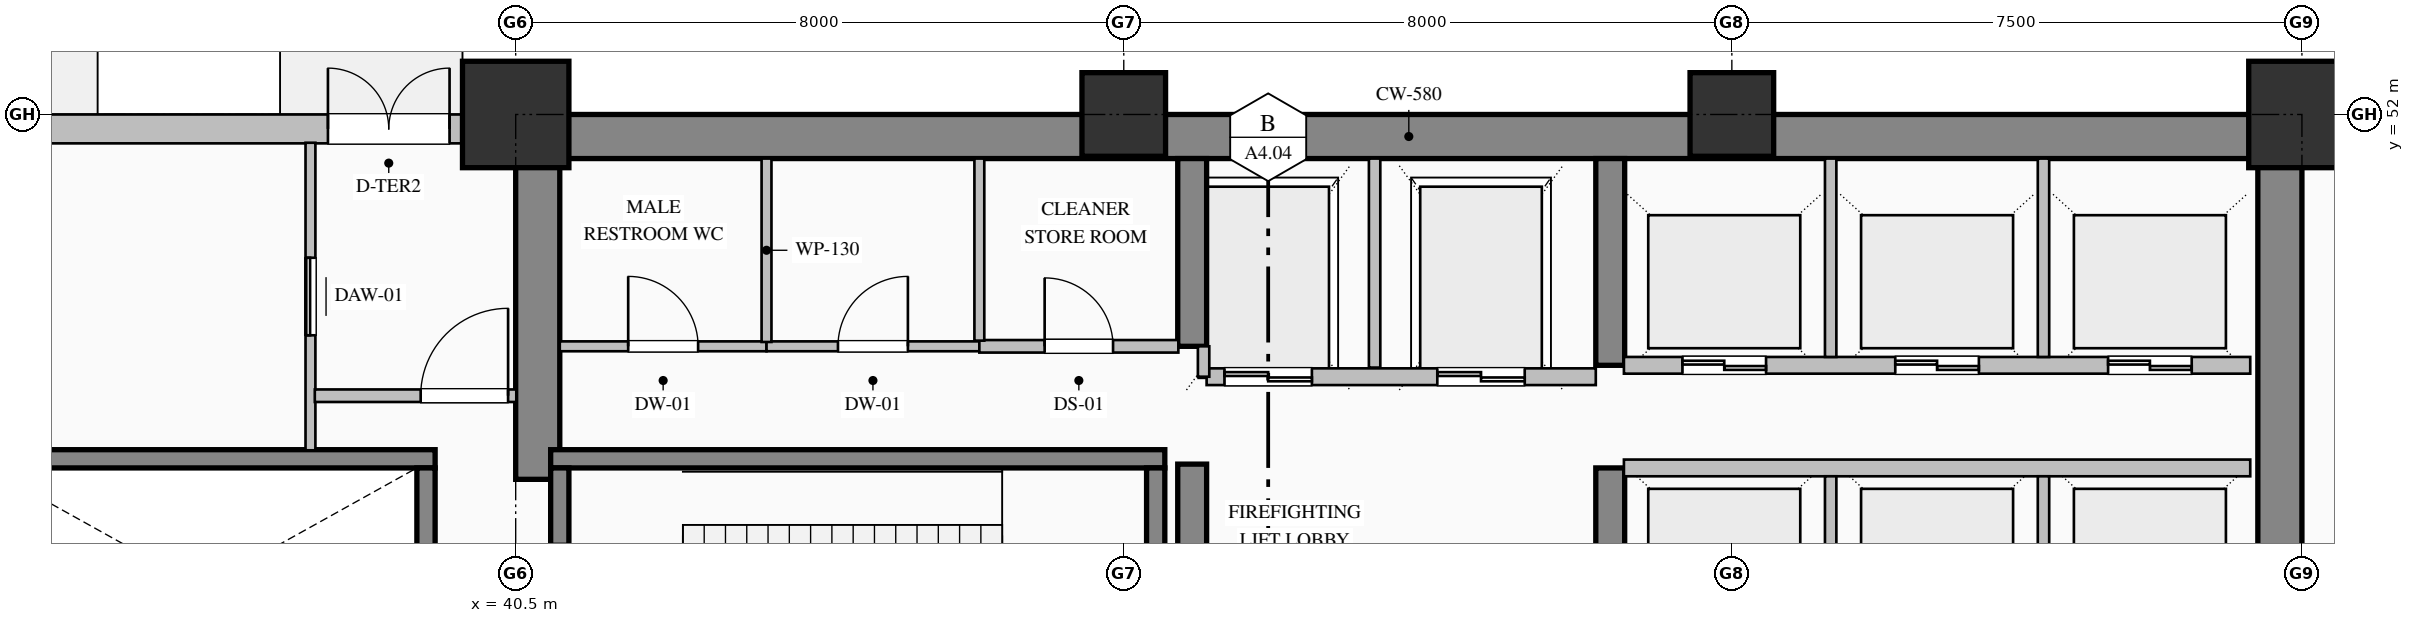
"""IFC4 building model, lengths in metres.
Left out: names, types, materials, properties, quantities, classifications, styles, units other than length and angle.
Written with IfcOpenShell. Run it as: python <this file> out.ifc"""

import sys

from ifc_helpers import new_model, si_unit, direction, frame, frame_2d, origin, origin_2d, place, context, subcontext, project, spatial, rectangle, hollow_rectangle, extrude, element, fill, save


model = new_model("IFC4")
c1 = context("Model", 3, precision=1e-05, world=origin(), true_north=direction((0.0, 1.0)))
c2 = subcontext(c1, "Body", "Model", "MODEL_VIEW")
j1 = project(units=[si_unit("LENGTHUNIT", "METRE"), si_unit("PLANEANGLEUNIT", "RADIAN")], contexts=[c1])
p1 = place(None, origin())
s1 = spatial("IfcSite", under=j1, at=p1, CompositionType="ELEMENT")
p2 = place(p1, origin())
s2 = spatial("IfcBuilding", under=s1, at=p2, CompositionType="ELEMENT")
p3 = place(p2, origin())
s3 = spatial("IfcBuildingStorey", under=s2, at=p3, CompositionType="ELEMENT", Elevation=0.0)
p4 = place(p3, frame((40.5, 51.71, 0.0), z_axis=(0.0, 0.0, 1.0), x_axis=(1.0, 0.0, 0.0)))
e1 = element("IfcWall", 1, at=p4, inside=s3, PredefinedType="SHEAR", context=c2, shape_type="SweptSolid", body=[
    extrude(rectangle(XDim=23.5, YDim=0.58, at=frame_2d((11.75, 0.0))), origin(), (0.0, 0.0, 1.0), 5.72),
])
p5 = place(p3, frame((63.71, 36.32, 0.0), z_axis=(0.0, 0.0, 1.0), x_axis=(0.0, 1.0, 0.0)))
e2 = element("IfcWall", 2, at=p5, inside=s3, PredefinedType="SHEAR", context=c2, shape_type="SweptSolid", body=[
    extrude(rectangle(XDim=15.1, YDim=0.58, at=frame_2d((7.55, 0.0))), origin(), (0.0, 0.0, 1.0), 5.72),
])
p6 = place(p3, frame((40.79, 47.2, 0.0), z_axis=(0.0, 0.0, 1.0), x_axis=(0.0, 1.0, 0.0)))
e3 = element("IfcWall", 3, at=p6, inside=s3, PredefinedType="SHEAR", context=c2, shape_type="SweptSolid", body=[
    extrude(rectangle(XDim=4.22, YDim=0.58, at=frame_2d((2.11, 0.0))), origin(), (0.0, 0.0, 1.0), 5.72),
])
p7 = place(p3, frame((49.4, 44.4, 0.0), z_axis=(0.0, 0.0, 1.0), x_axis=(0.0, 1.0, 0.0)))
e4 = element("IfcWall", 4, at=p7, inside=s3, PredefinedType="SHEAR", context=c2, shape_type="SweptSolid", body=[
    extrude(rectangle(XDim=3.0, YDim=0.38, at=frame_2d((1.5, 0.0))), origin(), (0.0, 0.0, 1.0), 5.72),
])
p8 = place(p3, frame((49.4, 48.95, 0.0), z_axis=(0.0, 0.0, 1.0), x_axis=(0.0, 1.0, 0.0)))
e5 = element("IfcWall", 5, at=p8, inside=s3, PredefinedType="SHEAR", context=c2, shape_type="SweptSolid", body=[
    extrude(rectangle(XDim=2.47, YDim=0.38, at=frame_2d((1.235, 0.0))), origin(), (0.0, 0.0, 1.0), 5.72),
])
p9 = place(p3, frame((54.9, 44.4, 0.0), z_axis=(0.0, 0.0, 1.0), x_axis=(0.0, 1.0, 0.0)))
e6 = element("IfcWall", 6, at=p9, inside=s3, PredefinedType="SHEAR", context=c2, shape_type="SweptSolid", body=[
    extrude(rectangle(XDim=2.95, YDim=0.38, at=frame_2d((1.475, 0.0))), origin(), (0.0, 0.0, 1.0), 5.72),
])
p10 = place(p3, frame((54.9, 48.7, 0.0), z_axis=(0.0, 0.0, 1.0), x_axis=(0.0, 1.0, 0.0)))
e7 = element("IfcWall", 7, at=p10, inside=s3, PredefinedType="SHEAR", context=c2, shape_type="SweptSolid", body=[
    extrude(rectangle(XDim=2.72, YDim=0.38, at=frame_2d((1.36, 0.0))), origin(), (0.0, 0.0, 1.0), 5.72),
])
p11 = place(p3, frame((40.5, 52.0, 0.0), z_axis=(0.0, 0.0, 1.0), x_axis=(1.0, 0.0, 0.0)))
e8 = element("IfcColumn", 8, at=p11, inside=s3, PredefinedType="COLUMN", context=c2, shape_type="SweptSolid", body=[
    extrude(hollow_rectangle(XDim=1.4, YDim=1.4, WallThickness=0.05, at=origin_2d()), origin(), (0.0, 0.0, 1.0), 6.0),
])
for number, where, z_axis, x_axis in (
    (9, (48.5, 52.0, 0.0), (0.0, 0.0, 1.0), (1.0, 0.0, 0.0)),
    (10, (56.5, 52.0, 0.0), (0.0, 0.0, 1.0), (1.0, 0.0, 0.0)),
):
    element("IfcColumn", number, at=place(p3, frame(where, z_axis=z_axis, x_axis=x_axis)), inside=s3, PredefinedType="COLUMN", context=c2, shape_type="SweptSolid", body=[
        extrude(hollow_rectangle(XDim=1.1, YDim=1.1, WallThickness=0.04, at=origin_2d()), origin(), (0.0, 0.0, 1.0), 6.0),
    ])
p12 = place(p3, frame((64.0, 52.0, 0.0), z_axis=(0.0, 0.0, 1.0), x_axis=(1.0, 0.0, 0.0)))
e11 = element("IfcColumn", 11, at=p12, inside=s3, PredefinedType="COLUMN", context=c2, shape_type="SweptSolid", body=[
    extrude(hollow_rectangle(XDim=1.4, YDim=1.4, WallThickness=0.05, at=origin_2d()), origin(), (0.0, 0.0, 1.0), 6.0),
])
p13 = place(p3, frame((63.98, 51.81, 0.0), z_axis=(0.0, 0.0, 1.0), x_axis=(1.0, 0.0, 0.0)))
e12 = element("IfcWall", 12, at=p13, inside=s3, PredefinedType="SOLIDWALL", context=c2, shape_type="SweptSolid", body=[
    extrude(rectangle(XDim=4.02, YDim=0.38, at=frame_2d((2.01, 0.0))), origin(), (0.0, 0.0, 1.0), 5.72),
])
p14 = place(p3, frame((4.0, 51.81, 0.0), z_axis=(0.0, 0.0, 1.0), x_axis=(1.0, 0.0, 0.0)))
e13 = element("IfcWall", 13, at=p14, inside=s3, PredefinedType="SOLIDWALL", context=c2, shape_type="SweptSolid", body=[
    extrude(rectangle(XDim=36.52, YDim=0.38, at=frame_2d((18.26, 0.0))), origin(), (0.0, 0.0, 1.0), 5.22),
])
p15 = place(p14, frame((25.2, 0.0, 0.0)))
e14 = element("IfcOpeningElement", 14, at=p15, cuts=e13, PredefinedType="OPENING", context=c2, shape_type="SweptSolid", body=[
    extrude(rectangle(XDim=2.0, YDim=2.4, at=frame_2d((1.0, 1.2))), frame((0.0, 0.2, 0.0), z_axis=(0.0, -1.0, 0.0), x_axis=(1.0, 0.0, 0.0)), (0.0, 0.0, 1.0), 0.4),
])
p16 = place(p14, frame((34.03, 0.0, 0.0)))
e15 = element("IfcOpeningElement", 15, at=p16, cuts=e13, PredefinedType="OPENING", context=c2, shape_type="SweptSolid", body=[
    extrude(rectangle(XDim=1.6, YDim=2.35, at=frame_2d((0.8, 1.175))), frame((0.0, 0.2, 0.0), z_axis=(0.0, -1.0, 0.0), x_axis=(1.0, 0.0, 0.0)), (0.0, 0.0, 1.0), 0.4),
])
p17 = place(p3, frame((40.96, 47.47, 0.0), z_axis=(0.0, 0.0, 1.0), x_axis=(1.0, 0.0, 0.0)))
e16 = element("IfcWall", 16, at=p17, inside=s3, PredefinedType="SOLIDWALL", context=c2, shape_type="SweptSolid", body=[
    extrude(rectangle(XDim=8.08, YDim=0.24, at=frame_2d((4.04, 0.0))), origin(), (0.0, 0.0, 1.0), 6.0),
])
p18 = place(p3, frame((41.08, 47.35, 0.0), z_axis=(0.0, 0.0, 1.0), x_axis=(0.0, -1.0, 0.0)))
e17 = element("IfcWall", 17, at=p18, inside=s3, PredefinedType="SOLIDWALL", context=c2, shape_type="SweptSolid", body=[
    extrude(rectangle(XDim=3.15, YDim=0.24, at=frame_2d((1.575, 0.0))), origin(), (0.0, 0.0, 1.0), 6.0),
])
p19 = place(p18, frame((1.0, 0.0, 0.0)))
e18 = element("IfcOpeningElement", 18, at=p19, cuts=e17, PredefinedType="OPENING", context=c2, shape_type="SweptSolid", body=[
    extrude(rectangle(XDim=1.15, YDim=2.2, at=frame_2d((0.575, 1.1))), frame((0.0, 0.13, 0.0), z_axis=(0.0, -1.0, 0.0), x_axis=(1.0, 0.0, 0.0)), (0.0, 0.0, 1.0), 0.26),
])
p20 = place(p3, frame((48.92, 44.2, 0.0), z_axis=(0.0, 0.0, 1.0), x_axis=(0.0, 1.0, 0.0)))
e19 = element("IfcWall", 19, at=p20, inside=s3, PredefinedType="SOLIDWALL", context=c2, shape_type="SweptSolid", body=[
    extrude(rectangle(XDim=3.15, YDim=0.24, at=frame_2d((1.575, 0.0))), origin(), (0.0, 0.0, 1.0), 6.0),
])
p21 = place(p3, frame((31.56, 47.47, 0.0), z_axis=(0.0, 0.0, 1.0), x_axis=(1.0, 0.0, 0.0)))
e20 = element("IfcWall", 20, at=p21, inside=s3, PredefinedType="SOLIDWALL", context=c2, shape_type="SweptSolid", body=[
    extrude(rectangle(XDim=7.88, YDim=0.24, at=frame_2d((3.94, 0.0))), origin(), (0.0, 0.0, 1.0), 6.0),
])
p22 = place(p3, frame((39.32, 44.2, 0.0), z_axis=(0.0, 0.0, 1.0), x_axis=(0.0, 1.0, 0.0)))
e21 = element("IfcWall", 21, at=p22, inside=s3, PredefinedType="SOLIDWALL", context=c2, shape_type="SweptSolid", body=[
    extrude(rectangle(XDim=3.15, YDim=0.24, at=frame_2d((1.575, 0.0))), origin(), (0.0, 0.0, 1.0), 6.0),
])
p23 = place(p3, frame((54.71, 48.55, 0.0), z_axis=(0.0, 0.0, 1.0), x_axis=(-1.0, 0.0, 0.0)))
e22 = element("IfcWall", 22, at=p23, inside=s3, PredefinedType="PARTITIONING", context=c2, shape_type="SweptSolid", body=[
    extrude(rectangle(XDim=5.12, YDim=0.22, at=frame_2d((2.56, 0.0))), origin(), (0.0, 0.0, 1.0), 5.72),
])
p24 = place(p23, frame((3.735, 0.0, 0.0)))
e23 = element("IfcOpeningElement", 23, at=p24, cuts=e22, PredefinedType="OPENING", context=c2, shape_type="SweptSolid", body=[
    extrude(rectangle(XDim=1.15, YDim=2.2, at=frame_2d((0.575, 1.1))), frame((0.0, 0.12, 0.0), z_axis=(0.0, -1.0, 0.0), x_axis=(1.0, 0.0, 0.0)), (0.0, 0.0, 1.0), 0.24),
])
p25 = place(p23, frame((0.935, 0.0, 0.0)))
e24 = element("IfcOpeningElement", 24, at=p25, cuts=e22, PredefinedType="OPENING", context=c2, shape_type="SweptSolid", body=[
    extrude(rectangle(XDim=1.15, YDim=2.2, at=frame_2d((0.575, 1.1))), frame((0.0, 0.12, 0.0), z_axis=(0.0, -1.0, 0.0), x_axis=(1.0, 0.0, 0.0)), (0.0, 0.0, 1.0), 0.24),
])
p26 = place(p3, frame((51.8, 48.67, 0.0), z_axis=(0.0, 0.0, 1.0), x_axis=(0.0, 1.0, 0.0)))
e25 = element("IfcWall", 25, at=p26, inside=s3, PredefinedType="PARTITIONING", context=c2, shape_type="SweptSolid", body=[
    extrude(rectangle(XDim=2.75, YDim=0.15, at=frame_2d((1.375, 0.0))), origin(), (0.0, 0.0, 1.0), 5.72),
])
p27 = place(p3, frame((49.55, 48.55, 0.0), z_axis=(0.0, 0.0, 1.0), x_axis=(0.0, 1.0, 0.0)))
e26 = element("IfcWall", 26, at=p27, inside=s3, PredefinedType="PARTITIONING", context=c2, shape_type="SweptSolid", body=[
    extrude(rectangle(XDim=0.4, YDim=0.15, at=frame_2d((0.2, 0.0))), origin(), (0.0, 0.0, 1.0), 5.72),
])
p28 = place(p3, frame((55.08, 47.35, 0.0), z_axis=(0.0, 0.0, 1.0), x_axis=(1.0, 0.0, 0.0)))
e27 = element("IfcWall", 27, at=p28, inside=s3, PredefinedType="PARTITIONING", context=c2, shape_type="SweptSolid", body=[
    extrude(rectangle(XDim=8.24, YDim=0.22, at=frame_2d((4.12, 0.0))), origin(), (0.0, 0.0, 1.0), 5.72),
])
for number, where, z_axis, x_axis in (
    (28, (57.8, 45.21, 0.0), (0.0, 0.0, 1.0), (0.0, 1.0, 0.0)),
    (29, (60.6, 45.21, 0.0), (0.0, 0.0, 1.0), (0.0, 1.0, 0.0)),
):
    element("IfcWall", number, at=place(p3, frame(where, z_axis=z_axis, x_axis=x_axis)), inside=s3, PredefinedType="PARTITIONING", context=c2, shape_type="SweptSolid", body=[
        extrude(rectangle(XDim=2.03, YDim=0.15, at=frame_2d((1.015, 0.0))), origin(), (0.0, 0.0, 1.0), 5.72),
    ])
p29 = place(p3, frame((63.32, 48.7, 0.0), z_axis=(0.0, 0.0, 1.0), x_axis=(-1.0, 0.0, 0.0)))
e30 = element("IfcWall", 30, at=p29, inside=s3, PredefinedType="PARTITIONING", context=c2, shape_type="SweptSolid", body=[
    extrude(rectangle(XDim=8.24, YDim=0.22, at=frame_2d((4.12, 0.0))), origin(), (0.0, 0.0, 1.0), 5.72),
])
p30 = place(p29, frame((6.37, 0.0, 0.0)))
e31 = element("IfcOpeningElement", 31, at=p30, cuts=e30, PredefinedType="OPENING", context=c2, shape_type="SweptSolid", body=[
    extrude(rectangle(XDim=1.1, YDim=2.2, at=frame_2d((0.55, 1.1))), frame((0.0, 0.12, 0.0), z_axis=(0.0, -1.0, 0.0), x_axis=(1.0, 0.0, 0.0)), (0.0, 0.0, 1.0), 0.24),
])
p31 = place(p29, frame((3.57, 0.0, 0.0)))
e32 = element("IfcOpeningElement", 32, at=p31, cuts=e30, PredefinedType="OPENING", context=c2, shape_type="SweptSolid", body=[
    extrude(rectangle(XDim=1.1, YDim=2.2, at=frame_2d((0.55, 1.1))), frame((0.0, 0.12, 0.0), z_axis=(0.0, -1.0, 0.0), x_axis=(1.0, 0.0, 0.0)), (0.0, 0.0, 1.0), 0.24),
])
p32 = place(p29, frame((0.77, 0.0, 0.0)))
e33 = element("IfcOpeningElement", 33, at=p32, cuts=e30, PredefinedType="OPENING", context=c2, shape_type="SweptSolid", body=[
    extrude(rectangle(XDim=1.1, YDim=2.2, at=frame_2d((0.55, 1.1))), frame((0.0, 0.12, 0.0), z_axis=(0.0, -1.0, 0.0), x_axis=(1.0, 0.0, 0.0)), (0.0, 0.0, 1.0), 0.24),
])
for number, where, z_axis, x_axis in (
    (34, (57.8, 48.81, 0.0), (0.0, 0.0, 1.0), (0.0, 1.0, 0.0)),
    (35, (60.6, 48.81, 0.0), (0.0, 0.0, 1.0), (0.0, 1.0, 0.0)),
):
    element("IfcWall", number, at=place(p3, frame(where, z_axis=z_axis, x_axis=x_axis)), inside=s3, PredefinedType="PARTITIONING", context=c2, shape_type="SweptSolid", body=[
        extrude(rectangle(XDim=2.61, YDim=0.15, at=frame_2d((1.305, 0.0))), origin(), (0.0, 0.0, 1.0), 5.72),
    ])
p33 = place(p3, frame((37.8, 47.582, 0.0), z_axis=(0.0, 0.0, 1.0), x_axis=(0.0, 1.0, 0.0)))
e36 = element("IfcWall", 36, at=p33, inside=s3, PredefinedType="PARTITIONING", context=c2, shape_type="SweptSolid", body=[
    extrude(rectangle(XDim=4.046, YDim=0.13, at=frame_2d((2.023, 0.0))), origin(), (0.0, 0.0, 1.0), 5.72),
])
p34 = place(p33, frame((1.513, 0.0, 0.0)))
e37 = element("IfcOpeningElement", 37, at=p34, cuts=e36, PredefinedType="OPENING", context=c2, shape_type="SweptSolid", body=[
    extrude(rectangle(XDim=1.02, YDim=2.15, at=frame_2d((0.51, 1.075))), frame((0.0, 0.075, 0.0), z_axis=(0.0, -1.0, 0.0), x_axis=(1.0, 0.0, 0.0)), (0.0, 0.0, 1.0), 0.15),
])
p35 = place(p3, frame((41.08, 48.95, 0.0), z_axis=(0.0, 0.0, 1.0), x_axis=(1.0, 0.0, 0.0)))
e38 = element("IfcWall", 38, at=p35, inside=s3, PredefinedType="PARTITIONING", context=c2, shape_type="SweptSolid", body=[
    extrude(rectangle(XDim=2.72, YDim=0.13, at=frame_2d((1.36, 0.0))), origin(), (0.0, 0.0, 1.0), 5.72),
])
p36 = place(p35, frame((0.9, 0.0, 0.0)))
e39 = element("IfcOpeningElement", 39, at=p36, cuts=e38, PredefinedType="OPENING", context=c2, shape_type="SweptSolid", body=[
    extrude(rectangle(XDim=0.92, YDim=2.15, at=frame_2d((0.46, 1.075))), frame((0.0, 0.075, 0.0), z_axis=(0.0, -1.0, 0.0), x_axis=(1.0, 0.0, 0.0)), (0.0, 0.0, 1.0), 0.15),
])
p37 = place(p3, frame((43.8, 48.95, 0.0), z_axis=(0.0, 0.0, 1.0), x_axis=(1.0, 0.0, 0.0)))
e40 = element("IfcWall", 40, at=p37, inside=s3, PredefinedType="PARTITIONING", context=c2, shape_type="SweptSolid", body=[
    extrude(rectangle(XDim=2.8, YDim=0.13, at=frame_2d((1.4, 0.0))), origin(), (0.0, 0.0, 1.0), 5.72),
])
p38 = place(p37, frame((0.94, 0.0, 0.0)))
e41 = element("IfcOpeningElement", 41, at=p38, cuts=e40, PredefinedType="OPENING", context=c2, shape_type="SweptSolid", body=[
    extrude(rectangle(XDim=0.92, YDim=2.15, at=frame_2d((0.46, 1.075))), frame((0.0, 0.075, 0.0), z_axis=(0.0, -1.0, 0.0), x_axis=(1.0, 0.0, 0.0)), (0.0, 0.0, 1.0), 0.15),
])
p39 = place(p3, frame((46.6, 48.95, 0.0), z_axis=(0.0, 0.0, 1.0), x_axis=(1.0, 0.0, 0.0)))
e42 = element("IfcWall", 42, at=p39, inside=s3, PredefinedType="PARTITIONING", context=c2, shape_type="SweptSolid", body=[
    extrude(rectangle(XDim=2.618, YDim=0.165, at=frame_2d((1.309, 0.0))), origin(), (0.0, 0.0, 1.0), 5.72),
])
p40 = place(p39, frame((0.859, 0.0, 0.0)))
e43 = element("IfcOpeningElement", 43, at=p40, cuts=e42, PredefinedType="OPENING", context=c2, shape_type="SweptSolid", body=[
    extrude(rectangle(XDim=0.9, YDim=2.15, at=frame_2d((0.45, 1.075))), frame((0.0, 0.093, 0.0), z_axis=(0.0, -1.0, 0.0), x_axis=(1.0, 0.0, 0.0)), (0.0, 0.0, 1.0), 0.185),
])
p41 = place(p3, frame((43.8, 51.42, 0.0), z_axis=(0.0, 0.0, 1.0), x_axis=(0.0, -1.0, 0.0)))
e44 = element("IfcWall", 44, at=p41, inside=s3, PredefinedType="PARTITIONING", context=c2, shape_type="SweptSolid", body=[
    extrude(rectangle(XDim=2.413, YDim=0.13, at=frame_2d((1.207, 0.0))), origin(), (0.0, 0.0, 1.0), 5.72),
])
p42 = place(p3, frame((46.6, 51.42, 0.0), z_axis=(0.0, 0.0, 1.0), x_axis=(0.0, -1.0, 0.0)))
e45 = element("IfcWall", 45, at=p42, inside=s3, PredefinedType="PARTITIONING", context=c2, shape_type="SweptSolid", body=[
    extrude(rectangle(XDim=2.396, YDim=0.13, at=frame_2d((1.198, 0.0))), origin(), (0.0, 0.0, 1.0), 5.72),
])
p43 = place(p3, frame((37.857, 48.3, 0.0), z_axis=(0.0, 0.0, 1.0), x_axis=(1.0, 0.0, 0.0)))
e46 = element("IfcWall", 46, at=p43, inside=s3, PredefinedType="PARTITIONING", context=c2, shape_type="SweptSolid", body=[
    extrude(rectangle(XDim=2.651, YDim=0.165, at=frame_2d((1.326, 0.0))), origin(), (0.0, 0.0, 1.0), 5.72),
])
p44 = place(p43, frame((1.393, 0.0, 0.0)))
e47 = element("IfcOpeningElement", 47, at=p44, cuts=e46, PredefinedType="OPENING", context=c2, shape_type="SweptSolid", body=[
    extrude(rectangle(XDim=1.15, YDim=2.2, at=frame_2d((0.575, 1.1))), frame((0.0, 0.093, 0.0), z_axis=(0.0, -1.0, 0.0), x_axis=(1.0, 0.0, 0.0)), (0.0, 0.0, 1.0), 0.185),
])
p45 = place(p16, origin())
e48 = element("IfcDoor", 48, at=p45, inside=s3, OperationType="DOUBLE_DOOR_SINGLE_SWING", PredefinedType="DOOR", context=c2, shape_type="SweptSolid", body=[
    extrude(rectangle(XDim=1.6, YDim=2.35, at=frame_2d((0.8, 1.175))), frame((0.0, 0.025, 0.0), z_axis=(0.0, -1.0, 0.0), x_axis=(1.0, 0.0, 0.0)), (0.0, 0.0, 1.0), 0.05),
])
fill(e15, e48)
p46 = place(p24, origin())
e49 = element("IfcDoor", 49, at=p46, inside=s3, OperationType="DOUBLE_DOOR_SLIDING", PredefinedType="DOOR", context=c2, shape_type="SweptSolid", body=[
    extrude(rectangle(XDim=1.15, YDim=2.2, at=frame_2d((0.575, 1.1))), frame((0.0, 0.025, 0.0), z_axis=(0.0, -1.0, 0.0), x_axis=(1.0, 0.0, 0.0)), (0.0, 0.0, 1.0), 0.05),
])
fill(e23, e49)
p47 = place(p25, origin())
e50 = element("IfcDoor", 50, at=p47, inside=s3, OperationType="DOUBLE_DOOR_SLIDING", PredefinedType="DOOR", context=c2, shape_type="SweptSolid", body=[
    extrude(rectangle(XDim=1.15, YDim=2.2, at=frame_2d((0.575, 1.1))), frame((0.0, 0.025, 0.0), z_axis=(0.0, -1.0, 0.0), x_axis=(1.0, 0.0, 0.0)), (0.0, 0.0, 1.0), 0.05),
])
fill(e24, e50)
p48 = place(p30, origin())
e51 = element("IfcDoor", 51, at=p48, inside=s3, OperationType="DOUBLE_DOOR_SLIDING", PredefinedType="DOOR", context=c2, shape_type="SweptSolid", body=[
    extrude(rectangle(XDim=1.1, YDim=2.2, at=frame_2d((0.55, 1.1))), frame((0.0, 0.025, 0.0), z_axis=(0.0, -1.0, 0.0), x_axis=(1.0, 0.0, 0.0)), (0.0, 0.0, 1.0), 0.05),
])
fill(e31, e51)
p49 = place(p31, origin())
e52 = element("IfcDoor", 52, at=p49, inside=s3, OperationType="DOUBLE_DOOR_SLIDING", PredefinedType="DOOR", context=c2, shape_type="SweptSolid", body=[
    extrude(rectangle(XDim=1.1, YDim=2.2, at=frame_2d((0.55, 1.1))), frame((0.0, 0.025, 0.0), z_axis=(0.0, -1.0, 0.0), x_axis=(1.0, 0.0, 0.0)), (0.0, 0.0, 1.0), 0.05),
])
fill(e32, e52)
p50 = place(p32, origin())
e53 = element("IfcDoor", 53, at=p50, inside=s3, OperationType="DOUBLE_DOOR_SLIDING", PredefinedType="DOOR", context=c2, shape_type="SweptSolid", body=[
    extrude(rectangle(XDim=1.1, YDim=2.2, at=frame_2d((0.55, 1.1))), frame((0.0, 0.025, 0.0), z_axis=(0.0, -1.0, 0.0), x_axis=(1.0, 0.0, 0.0)), (0.0, 0.0, 1.0), 0.05),
])
fill(e33, e53)
p51 = place(p34, origin())
e54 = element("IfcDoor", 54, at=p51, inside=s3, OperationType="SLIDING_TO_LEFT", PredefinedType="DOOR", context=c2, shape_type="SweptSolid", body=[
    extrude(rectangle(XDim=1.02, YDim=2.15, at=frame_2d((0.51, 1.075))), frame((0.0, 0.025, 0.0), z_axis=(0.0, -1.0, 0.0), x_axis=(1.0, 0.0, 0.0)), (0.0, 0.0, 1.0), 0.05),
])
fill(e37, e54)
p52 = place(p36, origin())
e55 = element("IfcDoor", 55, at=p52, inside=s3, OperationType="SINGLE_SWING_LEFT", PredefinedType="DOOR", context=c2, shape_type="SweptSolid", body=[
    extrude(rectangle(XDim=0.92, YDim=2.15, at=frame_2d((0.46, 1.075))), frame((0.0, 0.025, 0.0), z_axis=(0.0, -1.0, 0.0), x_axis=(1.0, 0.0, 0.0)), (0.0, 0.0, 1.0), 0.05),
])
fill(e39, e55)
p53 = place(p38, origin())
e56 = element("IfcDoor", 56, at=p53, inside=s3, OperationType="SINGLE_SWING_RIGHT", PredefinedType="DOOR", context=c2, shape_type="SweptSolid", body=[
    extrude(rectangle(XDim=0.92, YDim=2.15, at=frame_2d((0.46, 1.075))), frame((0.0, 0.025, 0.0), z_axis=(0.0, -1.0, 0.0), x_axis=(1.0, 0.0, 0.0)), (0.0, 0.0, 1.0), 0.05),
])
fill(e41, e56)
p54 = place(p40, origin())
e57 = element("IfcDoor", 57, at=p54, inside=s3, OperationType="SINGLE_SWING_LEFT", PredefinedType="DOOR", context=c2, shape_type="SweptSolid", body=[
    extrude(rectangle(XDim=0.9, YDim=2.15, at=frame_2d((0.45, 1.075))), frame((0.0, 0.025, 0.0), z_axis=(0.0, -1.0, 0.0), x_axis=(1.0, 0.0, 0.0)), (0.0, 0.0, 1.0), 0.05),
])
fill(e43, e57)
p55 = place(p44, origin())
e58 = element("IfcDoor", 58, at=p55, inside=s3, OperationType="SINGLE_SWING_RIGHT", PredefinedType="DOOR", context=c2, shape_type="SweptSolid", body=[
    extrude(rectangle(XDim=1.15, YDim=2.2, at=frame_2d((0.575, 1.1))), frame((0.0, 0.025, 0.0), z_axis=(0.0, -1.0, 0.0), x_axis=(1.0, 0.0, 0.0)), (0.0, 0.0, 1.0), 0.05),
])
fill(e47, e58)
save(model, sys.argv[1])
